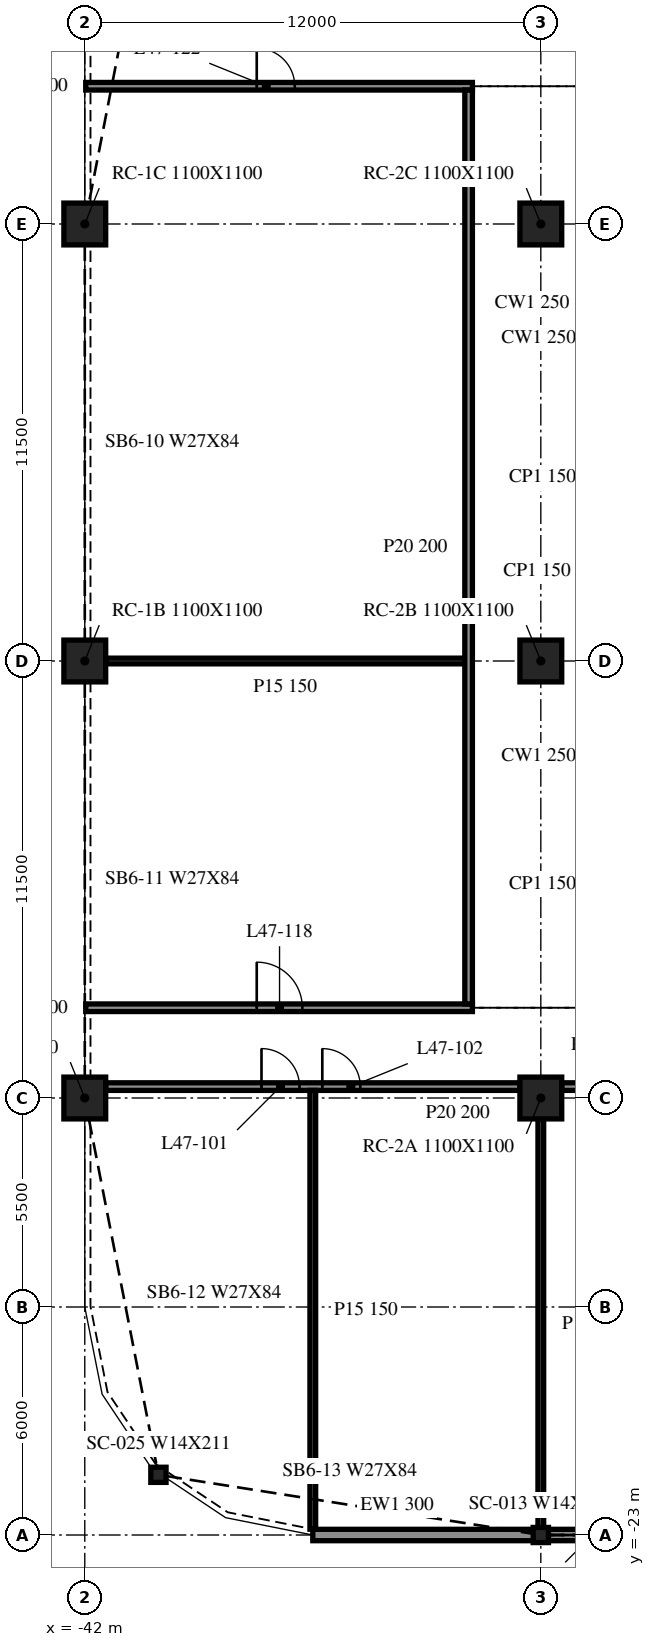
"""IFC4 building model, lengths in metres.
Left out: names, types, materials, properties, quantities, classifications, styles, units other than length and angle.
Written with IfcOpenShell. Run it as: python <this file> out.ifc"""

import sys

from ifc_helpers import new_model, si_unit, direction, frame, frame_2d, origin, origin_2d, place, context, subcontext, project, spatial, rectangle, i_section, extrude, element, fill, save


model = new_model("IFC4")
c1 = context("Model", 3, precision=1e-05, world=origin(), true_north=direction((0.0, 1.0)))
c2 = subcontext(c1, "Body", "Model", "MODEL_VIEW")
j1 = project(units=[si_unit("LENGTHUNIT", "METRE"), si_unit("PLANEANGLEUNIT", "RADIAN")], contexts=[c1])
p1 = place(None, origin())
s1 = spatial("IfcSite", under=j1, at=p1, CompositionType="ELEMENT")
p2 = place(p1, origin())
s2 = spatial("IfcBuilding", under=s1, at=p2, CompositionType="ELEMENT")
p3 = place(p2, frame((0.0, 0.0, 197.7)))
s3 = spatial("IfcBuildingStorey", under=s2, at=p3, CompositionType="ELEMENT", Elevation=197.7)
for number, where, z_axis, x_axis in (
    (1, (-42.0, -11.5, -0.34), (0.0, 0.0, 1.0), (1.0, 0.0, 0.0)),
    (2, (-42.0, 0.0, -0.34), (0.0, 0.0, 1.0), (1.0, 0.0, 0.0)),
    (3, (-42.0, 11.5, -0.34), (0.0, 0.0, 1.0), (1.0, 0.0, 0.0)),
    (4, (-30.0, -11.5, -0.34), (0.0, 0.0, 1.0), (1.0, 0.0, 0.0)),
    (5, (-30.0, 0.0, -0.34), (0.0, 0.0, 1.0), (1.0, 0.0, 0.0)),
    (6, (-30.0, 11.5, -0.34), (0.0, 0.0, 1.0), (1.0, 0.0, 0.0)),
):
    element("IfcColumn", number, at=place(p3, frame(where, z_axis=z_axis, x_axis=x_axis)), inside=s3, PredefinedType="COLUMN", context=c2, shape_type="SweptSolid", body=[
        extrude(rectangle(XDim=1.1, YDim=1.1, at=origin_2d()), origin(), (0.0, 0.0, 1.0), 3.8),
    ])
for number, where, z_axis, x_axis in (
    (7, (-40.062, -21.416, -0.34), (0.0, 0.0, 1.0), (1.0, 0.0, 0.0)),
    (8, (-30.0, -23.0, -0.34), (0.0, 0.0, 1.0), (1.0, 0.0, 0.0)),
):
    element("IfcColumn", number, at=place(p3, frame(where, z_axis=z_axis, x_axis=x_axis)), inside=s3, PredefinedType="COLUMN", context=c2, shape_type="SweptSolid", body=[
        extrude(i_section(OverallWidth=0.401, OverallDepth=0.399, WebThickness=0.025, FlangeThickness=0.04, at=origin_2d()), origin(), (0.0, 0.0, 1.0), 3.8),
    ])
p4 = place(p3, frame((-36.0, -23.0, 0.0), z_axis=(0.0, 0.0, 1.0), x_axis=(1.0, 0.0, 0.0)))
e9 = element("IfcWall", 9, at=p4, inside=s3, PredefinedType="NOTDEFINED", context=c2, shape_type="SweptSolid", body=[
    extrude(rectangle(XDim=5.988, YDim=0.3, at=frame_2d((2.994, 0.0))), origin(), (0.0, 0.0, 1.0), 2.782),
])
p5 = place(p3, frame((-29.988, -23.0, 0.0), z_axis=(0.0, 0.0, 1.0), x_axis=(1.0, 0.0, 0.0)))
e10 = element("IfcWall", 10, at=p5, inside=s3, PredefinedType="NOTDEFINED", context=c2, shape_type="SweptSolid", body=[
    extrude(rectangle(XDim=11.975, YDim=0.3, at=frame_2d((5.988, 0.0))), origin(), (0.0, 0.0, 1.0), 2.782),
])
p6 = place(p3, frame((-41.45, -11.2, 0.0), z_axis=(0.0, 0.0, 1.0), x_axis=(1.0, 0.0, 0.0)))
e11 = element("IfcWall", 11, at=p6, inside=s3, PredefinedType="PARTITIONING", context=c2, shape_type="SweptSolid", body=[
    extrude(rectangle(XDim=10.9, YDim=0.2, at=frame_2d((5.45, 0.0))), origin(), (0.0, 0.0, 1.0), 3.46),
])
p7 = place(p6, frame((4.1, 0.0, 0.0)))
e12 = element("IfcOpeningElement", 12, at=p7, cuts=e11, PredefinedType="OPENING", context=c2, shape_type="SweptSolid", body=[
    extrude(rectangle(XDim=1.0, YDim=2.1, at=frame_2d((0.5, 1.05))), frame((0.0, 0.11, 0.0), z_axis=(0.0, -1.0, 0.0), x_axis=(1.0, 0.0, 0.0)), (0.0, 0.0, 1.0), 0.22),
])
p8 = place(p6, frame((5.7, 0.0, 0.0)))
e13 = element("IfcOpeningElement", 13, at=p8, cuts=e11, PredefinedType="OPENING", context=c2, shape_type="SweptSolid", body=[
    extrude(rectangle(XDim=1.0, YDim=2.1, at=frame_2d((0.5, 1.05))), frame((0.0, 0.11, 0.0), z_axis=(0.0, -1.0, 0.0), x_axis=(1.0, 0.0, 0.0)), (0.0, 0.0, 1.0), 0.22),
])
p9 = place(p3, frame((-29.45, -11.2, 0.0), z_axis=(0.0, 0.0, 1.0), x_axis=(1.0, 0.0, 0.0)))
e14 = element("IfcWall", 14, at=p9, inside=s3, PredefinedType="PARTITIONING", context=c2, shape_type="SweptSolid", body=[
    extrude(rectangle(XDim=10.9, YDim=0.2, at=frame_2d((5.45, 0.0))), origin(), (0.0, 0.0, 1.0), 3.46),
])
p10 = place(p9, frame((4.9, 0.0, 0.0)))
e15 = element("IfcOpeningElement", 15, at=p10, cuts=e14, PredefinedType="OPENING", context=c2, shape_type="SweptSolid", body=[
    extrude(rectangle(XDim=1.2, YDim=2.1, at=frame_2d((0.6, 1.05))), frame((0.0, 0.11, 0.0), z_axis=(0.0, -1.0, 0.0), x_axis=(1.0, 0.0, 0.0)), (0.0, 0.0, 1.0), 0.22),
])
p11 = place(p9, frame((8.7, 0.0, 0.0)))
e16 = element("IfcOpeningElement", 16, at=p11, cuts=e14, PredefinedType="OPENING", context=c2, shape_type="SweptSolid", body=[
    extrude(rectangle(XDim=1.0, YDim=2.1, at=frame_2d((0.5, 1.05))), frame((0.0, 0.11, 0.0), z_axis=(0.0, -1.0, 0.0), x_axis=(1.0, 0.0, 0.0)), (0.0, 0.0, 1.0), 0.22),
])
p12 = place(p3, frame((-41.975, -9.125, 0.0), z_axis=(0.0, 0.0, 1.0), x_axis=(1.0, 0.0, 0.0)))
e17 = element("IfcWall", 17, at=p12, inside=s3, PredefinedType="PARTITIONING", context=c2, shape_type="SweptSolid", body=[
    extrude(rectangle(XDim=10.175, YDim=0.2, at=frame_2d((5.087, 0.0))), origin(), (0.0, 0.0, 1.0), 3.46),
])
p13 = place(p12, frame((4.5, 0.0, 0.0)))
e18 = element("IfcOpeningElement", 18, at=p13, cuts=e17, PredefinedType="OPENING", context=c2, shape_type="SweptSolid", body=[
    extrude(rectangle(XDim=1.2, YDim=2.1, at=frame_2d((0.6, 1.05))), frame((0.0, 0.11, 0.0), z_axis=(0.0, -1.0, 0.0), x_axis=(1.0, 0.0, 0.0)), (0.0, 0.0, 1.0), 0.22),
])
p14 = place(p3, frame((-41.45, 0.0, 0.0), z_axis=(0.0, 0.0, 1.0), x_axis=(1.0, 0.0, 0.0)))
e19 = element("IfcWall", 19, at=p14, inside=s3, PredefinedType="PARTITIONING", context=c2, shape_type="SweptSolid", body=[
    extrude(rectangle(XDim=9.45, YDim=0.15, at=frame_2d((4.725, 0.0))), origin(), (0.0, 0.0, 1.0), 3.46),
])
p15 = place(p3, frame((-41.975, 15.125, 0.0), z_axis=(0.0, 0.0, 1.0), x_axis=(1.0, 0.0, 0.0)))
e20 = element("IfcWall", 20, at=p15, inside=s3, PredefinedType="PARTITIONING", context=c2, shape_type="SweptSolid", body=[
    extrude(rectangle(XDim=10.175, YDim=0.2, at=frame_2d((5.087, 0.0))), origin(), (0.0, 0.0, 1.0), 3.46),
])
p16 = place(p15, frame((4.5, 0.0, 0.0)))
e21 = element("IfcOpeningElement", 21, at=p16, cuts=e20, PredefinedType="OPENING", context=c2, shape_type="SweptSolid", body=[
    extrude(rectangle(XDim=1.0, YDim=2.1, at=frame_2d((0.5, 1.05))), frame((0.0, 0.11, 0.0), z_axis=(0.0, -1.0, 0.0), x_axis=(1.0, 0.0, 0.0)), (0.0, 0.0, 1.0), 0.22),
])
p17 = place(p3, frame((-36.0, -22.847, 0.0), z_axis=(0.0, 0.0, 1.0), x_axis=(0.0, 1.0, 0.0)))
e22 = element("IfcWall", 22, at=p17, inside=s3, PredefinedType="PARTITIONING", context=c2, shape_type="SweptSolid", body=[
    extrude(rectangle(XDim=11.547, YDim=0.15, at=frame_2d((5.773, 0.0))), origin(), (0.0, 0.0, 1.0), 3.46),
])
p18 = place(p3, frame((-31.9, -9.025, 0.0), z_axis=(0.0, 0.0, 1.0), x_axis=(0.0, 1.0, 0.0)))
e23 = element("IfcWall", 23, at=p18, inside=s3, PredefinedType="PARTITIONING", context=c2, shape_type="SweptSolid", body=[
    extrude(rectangle(XDim=24.05, YDim=0.2, at=frame_2d((12.025, 0.0))), origin(), (0.0, 0.0, 1.0), 3.46),
])
p19 = place(p3, frame((-30.0, -22.85, 0.0), z_axis=(0.0, 0.0, 1.0), x_axis=(0.0, 1.0, 0.0)))
e24 = element("IfcWall", 24, at=p19, inside=s3, PredefinedType="PARTITIONING", context=c2, shape_type="SweptSolid", body=[
    extrude(rectangle(XDim=10.8, YDim=0.15, at=frame_2d((5.4, 0.0))), origin(), (0.0, 0.0, 1.0), 3.46),
])
p20 = place(p7, origin())
e25 = element("IfcDoor", 25, at=p20, inside=s3, OperationType="SINGLE_SWING_RIGHT", PredefinedType="DOOR", context=c2, shape_type="SweptSolid", body=[
    extrude(rectangle(XDim=1.0, YDim=2.1, at=frame_2d((0.5, 1.05))), frame((0.0, 0.025, 0.0), z_axis=(0.0, -1.0, 0.0), x_axis=(1.0, 0.0, 0.0)), (0.0, 0.0, 1.0), 0.05),
])
fill(e12, e25)
p21 = place(p8, origin())
e26 = element("IfcDoor", 26, at=p21, inside=s3, OperationType="SINGLE_SWING_LEFT", PredefinedType="DOOR", context=c2, shape_type="SweptSolid", body=[
    extrude(rectangle(XDim=1.0, YDim=2.1, at=frame_2d((0.5, 1.05))), frame((0.0, 0.025, 0.0), z_axis=(0.0, -1.0, 0.0), x_axis=(1.0, 0.0, 0.0)), (0.0, 0.0, 1.0), 0.05),
])
fill(e13, e26)
p22 = place(p13, origin())
e27 = element("IfcDoor", 27, at=p22, inside=s3, OperationType="SINGLE_SWING_RIGHT", PredefinedType="DOOR", context=c2, shape_type="SweptSolid", body=[
    extrude(rectangle(XDim=1.2, YDim=2.1, at=frame_2d((0.6, 1.05))), frame((0.0, 0.025, 0.0), z_axis=(0.0, -1.0, 0.0), x_axis=(1.0, 0.0, 0.0)), (0.0, 0.0, 1.0), 0.05),
])
fill(e18, e27)
p23 = place(p16, origin())
e28 = element("IfcDoor", 28, at=p23, inside=s3, OperationType="SINGLE_SWING_RIGHT", PredefinedType="DOOR", context=c2, shape_type="SweptSolid", body=[
    extrude(rectangle(XDim=1.0, YDim=2.1, at=frame_2d((0.5, 1.05))), frame((0.0, 0.025, 0.0), z_axis=(0.0, -1.0, 0.0), x_axis=(1.0, 0.0, 0.0)), (0.0, 0.0, 1.0), 0.05),
])
fill(e21, e28)
save(model, sys.argv[1])
